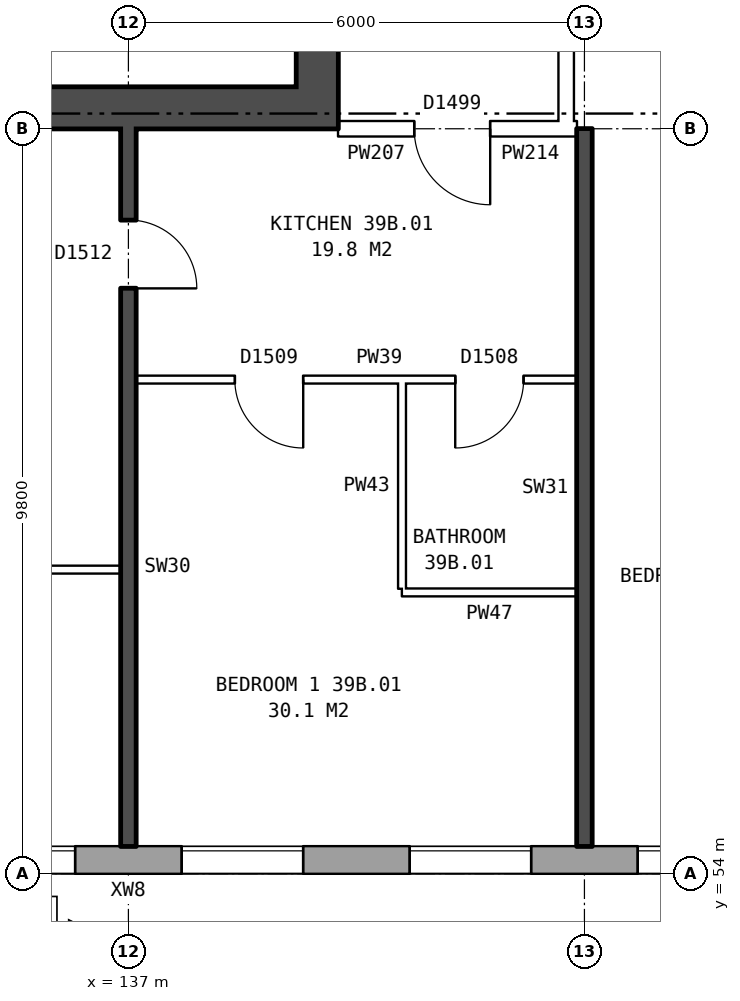
"""IFC4 building model, lengths in metres.
Left out: names, types, materials, properties, quantities, classifications, styles, units other than length and angle.
Written with IfcOpenShell. Run it as: python <this file> out.ifc"""

import sys

from ifc_helpers import new_model, si_unit, direction, frame, frame_2d, origin, place, context, subcontext, project, spatial, rectangle, extrude, element, fill, save


model = new_model("IFC4")
c1 = context("Model", 3, precision=1e-05, world=origin(), true_north=direction((0.0, 1.0)))
c2 = subcontext(c1, "Body", "Model", "MODEL_VIEW")
j1 = project(units=[si_unit("LENGTHUNIT", "METRE"), si_unit("PLANEANGLEUNIT", "RADIAN")], contexts=[c1])
p1 = place(None, origin())
s1 = spatial("IfcSite", under=j1, at=p1, CompositionType="ELEMENT")
p2 = place(p1, origin())
s2 = spatial("IfcBuilding", under=s1, at=p2, CompositionType="ELEMENT")
p3 = place(p2, frame((0.0, 0.0, 139.2)))
s3 = spatial("IfcBuildingStorey", under=s2, at=p3, CompositionType="ELEMENT", Elevation=139.2)
p4 = place(p3, frame((134.075, 54.18, 0.0), z_axis=(0.0, 0.0, 1.0), x_axis=(1.0, 0.0, 0.0)))
e1 = element("IfcWall", 1, at=p4, inside=s3, PredefinedType="STANDARD", context=c2, shape_type="SweptSolid", body=[
    extrude(rectangle(XDim=35.601, YDim=0.36, at=frame_2d((17.8, 0.0))), origin(), (0.0, 0.0, 1.0), 2.85),
])
p5 = place(p4, frame((0.625, 0.0, 0.8)))
e2 = element("IfcOpeningElement", 2, at=p5, cuts=e1, PredefinedType="OPENING", context=c2, shape_type="SweptSolid", body=[
    extrude(rectangle(XDim=1.6, YDim=1.8, at=frame_2d((0.8, 0.9))), frame((0.0, 0.19, 0.0), z_axis=(0.0, -1.0, 0.0), x_axis=(1.0, 0.0, 0.0)), (0.0, 0.0, 1.0), 0.38),
])
p6 = place(p4, frame((3.625, 0.0, 0.8)))
e3 = element("IfcOpeningElement", 3, at=p6, cuts=e1, PredefinedType="OPENING", context=c2, shape_type="SweptSolid", body=[
    extrude(rectangle(XDim=1.6, YDim=1.8, at=frame_2d((0.8, 0.9))), frame((0.0, 0.19, 0.0), z_axis=(0.0, -1.0, 0.0), x_axis=(1.0, 0.0, 0.0)), (0.0, 0.0, 1.0), 0.38),
])
p7 = place(p4, frame((6.625, 0.0, 0.8)))
e4 = element("IfcOpeningElement", 4, at=p7, cuts=e1, PredefinedType="OPENING", context=c2, shape_type="SweptSolid", body=[
    extrude(rectangle(XDim=1.6, YDim=1.8, at=frame_2d((0.8, 0.9))), frame((0.0, 0.19, 0.0), z_axis=(0.0, -1.0, 0.0), x_axis=(1.0, 0.0, 0.0)), (0.0, 0.0, 1.0), 0.38),
])
p8 = place(p4, frame((9.625, 0.0, 0.8)))
e5 = element("IfcOpeningElement", 5, at=p8, cuts=e1, PredefinedType="OPENING", context=c2, shape_type="SweptSolid", body=[
    extrude(rectangle(XDim=1.6, YDim=1.8, at=frame_2d((0.8, 0.9))), frame((0.0, 0.19, 0.0), z_axis=(0.0, -1.0, 0.0), x_axis=(1.0, 0.0, 0.0)), (0.0, 0.0, 1.0), 0.38),
])
p9 = place(p4, frame((12.625, 0.0, 0.8)))
e6 = element("IfcOpeningElement", 6, at=p9, cuts=e1, PredefinedType="OPENING", context=c2, shape_type="SweptSolid", body=[
    extrude(rectangle(XDim=1.6, YDim=1.8, at=frame_2d((0.8, 0.9))), frame((0.0, 0.19, 0.0), z_axis=(0.0, -1.0, 0.0), x_axis=(1.0, 0.0, 0.0)), (0.0, 0.0, 1.0), 0.38),
])
p10 = place(p4, frame((15.125, 0.0, 1.25)))
e7 = element("IfcOpeningElement", 7, at=p10, cuts=e1, PredefinedType="OPENING", context=c2, shape_type="SweptSolid", body=[
    extrude(rectangle(XDim=0.8, YDim=1.2, at=frame_2d((0.4, 0.6))), frame((0.0, 0.19, 0.0), z_axis=(0.0, -1.0, 0.0), x_axis=(1.0, 0.0, 0.0)), (0.0, 0.0, 1.0), 0.38),
])
p11 = place(p4, frame((18.075, 0.0, 0.25)))
e8 = element("IfcOpeningElement", 8, at=p11, cuts=e1, PredefinedType="OPENING", context=c2, shape_type="SweptSolid", body=[
    extrude(rectangle(XDim=0.6, YDim=0.9, at=frame_2d((0.3, 0.45))), frame((0.0, 0.19, 0.0), z_axis=(0.0, -1.0, 0.0), x_axis=(1.0, 0.0, 0.0)), (0.0, 0.0, 1.0), 0.38),
])
p12 = place(p4, frame((21.625, 0.0, 0.8)))
e9 = element("IfcOpeningElement", 9, at=p12, cuts=e1, PredefinedType="OPENING", context=c2, shape_type="SweptSolid", body=[
    extrude(rectangle(XDim=1.6, YDim=1.8, at=frame_2d((0.8, 0.9))), frame((0.0, 0.19, 0.0), z_axis=(0.0, -1.0, 0.0), x_axis=(1.0, 0.0, 0.0)), (0.0, 0.0, 1.0), 0.38),
])
p13 = place(p4, frame((24.625, 0.0, 0.8)))
e10 = element("IfcOpeningElement", 10, at=p13, cuts=e1, PredefinedType="OPENING", context=c2, shape_type="SweptSolid", body=[
    extrude(rectangle(XDim=1.6, YDim=1.8, at=frame_2d((0.8, 0.9))), frame((0.0, 0.19, 0.0), z_axis=(0.0, -1.0, 0.0), x_axis=(1.0, 0.0, 0.0)), (0.0, 0.0, 1.0), 0.38),
])
p14 = place(p4, frame((27.625, 0.0, 0.8)))
e11 = element("IfcOpeningElement", 11, at=p14, cuts=e1, PredefinedType="OPENING", context=c2, shape_type="SweptSolid", body=[
    extrude(rectangle(XDim=1.6, YDim=1.8, at=frame_2d((0.8, 0.9))), frame((0.0, 0.19, 0.0), z_axis=(0.0, -1.0, 0.0), x_axis=(1.0, 0.0, 0.0)), (0.0, 0.0, 1.0), 0.38),
])
p15 = place(p4, frame((30.625, 0.0, 0.8)))
e12 = element("IfcOpeningElement", 12, at=p15, cuts=e1, PredefinedType="OPENING", context=c2, shape_type="SweptSolid", body=[
    extrude(rectangle(XDim=1.6, YDim=1.8, at=frame_2d((0.8, 0.9))), frame((0.0, 0.19, 0.0), z_axis=(0.0, -1.0, 0.0), x_axis=(1.0, 0.0, 0.0)), (0.0, 0.0, 1.0), 0.38),
])
p16 = place(p4, frame((33.625, 0.0, 0.8)))
e13 = element("IfcOpeningElement", 13, at=p16, cuts=e1, PredefinedType="OPENING", context=c2, shape_type="SweptSolid", body=[
    extrude(rectangle(XDim=1.6, YDim=1.8, at=frame_2d((0.8, 0.9))), frame((0.0, 0.19, 0.0), z_axis=(0.0, -1.0, 0.0), x_axis=(1.0, 0.0, 0.0)), (0.0, 0.0, 1.0), 0.38),
])
p17 = place(p4, frame((16.825, 0.0, 0.15)))
e14 = element("IfcOpeningElement", 14, at=p17, cuts=e1, PredefinedType="OPENING", context=c2, shape_type="SweptSolid", body=[
    extrude(rectangle(XDim=0.8, YDim=0.9, at=frame_2d((0.4, 0.45))), frame((0.0, 0.19, 0.0), z_axis=(0.0, -1.0, 0.0), x_axis=(1.0, 0.0, 0.0)), (0.0, 0.0, 1.0), 0.38),
])
p18 = place(p4, frame((19.325, 0.0, 1.65)))
e15 = element("IfcOpeningElement", 15, at=p18, cuts=e1, PredefinedType="OPENING", context=c2, shape_type="SweptSolid", body=[
    extrude(rectangle(XDim=1.4, YDim=0.9, at=frame_2d((0.7, 0.45))), frame((0.0, 0.19, 0.0), z_axis=(0.0, -1.0, 0.0), x_axis=(1.0, 0.0, 0.0)), (0.0, 0.0, 1.0), 0.38),
])
p19 = place(p3, frame((139.485, 63.8, 0.0), z_axis=(0.0, 0.0, 1.0), x_axis=(0.0, 1.0, 0.0)))
e16 = element("IfcWall", 16, at=p19, inside=s3, PredefinedType="SHEAR", context=c2, shape_type="SweptSolid", body=[
    extrude(rectangle(XDim=12.4, YDim=0.55, at=frame_2d((6.2, 0.0))), origin(), (0.0, 0.0, 1.0), 2.85),
])
p20 = place(p19, frame((1.325, 0.0, 0.0)))
e17 = element("IfcOpeningElement", 17, at=p20, cuts=e16, PredefinedType="OPENING", context=c2, shape_type="SweptSolid", body=[
    extrude(rectangle(XDim=1.1, YDim=2.1, at=frame_2d((0.55, 1.05))), frame((0.0, 0.285, 0.0), z_axis=(0.0, -1.0, 0.0), x_axis=(1.0, 0.0, 0.0)), (0.0, 0.0, 1.0), 0.57),
])
p21 = place(p19, frame((3.6, 0.0, 0.0)))
e18 = element("IfcOpeningElement", 18, at=p21, cuts=e16, PredefinedType="OPENING", context=c2, shape_type="SweptSolid", body=[
    extrude(rectangle(XDim=1.1, YDim=2.1, at=frame_2d((0.55, 1.05))), frame((0.0, 0.285, 0.0), z_axis=(0.0, -1.0, 0.0), x_axis=(1.0, 0.0, 0.0)), (0.0, 0.0, 1.0), 0.57),
])
p22 = place(p19, frame((5.8, 0.0, 0.0)))
e19 = element("IfcOpeningElement", 19, at=p22, cuts=e16, PredefinedType="OPENING", context=c2, shape_type="SweptSolid", body=[
    extrude(rectangle(XDim=1.1, YDim=2.1, at=frame_2d((0.55, 1.05))), frame((0.0, 0.285, 0.0), z_axis=(0.0, -1.0, 0.0), x_axis=(1.0, 0.0, 0.0)), (0.0, 0.0, 1.0), 0.57),
])
p23 = place(p19, frame((9.9, 0.0, 0.0)))
e20 = element("IfcOpeningElement", 20, at=p23, cuts=e16, PredefinedType="OPENING", context=c2, shape_type="SweptSolid", body=[
    extrude(rectangle(XDim=1.1, YDim=2.1, at=frame_2d((0.55, 1.05))), frame((0.0, 0.285, 0.0), z_axis=(0.0, -1.0, 0.0), x_axis=(1.0, 0.0, 0.0)), (0.0, 0.0, 1.0), 0.57),
])
p24 = place(p19, frame((8.125, 0.0, 0.0)))
e21 = element("IfcOpeningElement", 21, at=p24, cuts=e16, PredefinedType="OPENING", context=c2, shape_type="SweptSolid", body=[
    extrude(rectangle(XDim=0.85, YDim=2.1, at=frame_2d((0.425, 1.05))), frame((0.0, 0.285, 0.0), z_axis=(0.0, -1.0, 0.0), x_axis=(1.0, 0.0, 0.0)), (0.0, 0.0, 1.0), 0.57),
])
p25 = place(p3, frame((139.21, 64.075, 0.0), z_axis=(0.0, 0.0, 1.0), x_axis=(-1.0, 0.0, 0.0)))
e22 = element("IfcWall", 22, at=p25, inside=s3, PredefinedType="SHEAR", context=c2, shape_type="SweptSolid", body=[
    extrude(rectangle(XDim=7.3, YDim=0.55, at=frame_2d((3.65, 0.0))), origin(), (0.0, 0.0, 1.0), 2.85),
])
p26 = place(p3, frame((142.76, 63.9, 0.0), z_axis=(0.0, 0.0, 1.0), x_axis=(0.0, 1.0, 0.0)))
e23 = element("IfcWall", 23, at=p26, inside=s3, PredefinedType="PARTITIONING", context=c2, shape_type="SweptSolid", body=[
    extrude(rectangle(XDim=12.2, YDim=0.2, at=frame_2d((6.1, 0.0))), origin(), (0.0, 0.0, 1.0), 2.85),
])
p27 = place(p26, frame((5.1, 0.0, 0.0)))
e24 = element("IfcOpeningElement", 24, at=p27, cuts=e23, PredefinedType="OPENING", context=c2, shape_type="SweptSolid", body=[
    extrude(rectangle(XDim=2.0, YDim=2.1, at=frame_2d((1.0, 1.05))), frame((0.0, 0.11, 0.0), z_axis=(0.0, -1.0, 0.0), x_axis=(1.0, 0.0, 0.0)), (0.0, 0.0, 1.0), 0.22),
])
p28 = place(p3, frame((140.6, 57.7, 0.0), z_axis=(0.0, 0.0, 1.0), x_axis=(1.0, 0.0, 0.0)))
e25 = element("IfcWall", 25, at=p28, inside=s3, PredefinedType="PARTITIONING", context=c2, shape_type="SweptSolid", body=[
    extrude(rectangle(XDim=2.3, YDim=0.1, at=frame_2d((1.15, 0.0))), origin(), (0.0, 0.0, 1.0), 2.85),
])
p29 = place(p3, frame((131.36, 58.0, 0.0), z_axis=(0.0, 0.0, 1.0), x_axis=(1.0, 0.0, 0.0)))
e26 = element("IfcWall", 26, at=p29, inside=s3, PredefinedType="PARTITIONING", context=c2, shape_type="SweptSolid", body=[
    extrude(rectangle(XDim=5.54, YDim=0.1, at=frame_2d((2.77, 0.0))), origin(), (0.0, 0.0, 1.0), 2.85),
])
p30 = place(p29, frame((2.32, 0.0, 0.0)))
e27 = element("IfcOpeningElement", 27, at=p30, cuts=e26, PredefinedType="OPENING", context=c2, shape_type="SweptSolid", body=[
    extrude(rectangle(XDim=0.9, YDim=2.1, at=frame_2d((0.45, 1.05))), frame((0.0, 0.06, 0.0), z_axis=(0.0, -1.0, 0.0), x_axis=(1.0, 0.0, 0.0)), (0.0, 0.0, 1.0), 0.12),
])
p31 = place(p3, frame((137.1, 60.5, 0.0), z_axis=(0.0, 0.0, 1.0), x_axis=(1.0, 0.0, 0.0)))
e28 = element("IfcWall", 28, at=p31, inside=s3, PredefinedType="PARTITIONING", context=c2, shape_type="SweptSolid", body=[
    extrude(rectangle(XDim=5.8, YDim=0.1, at=frame_2d((2.9, 0.0))), origin(), (0.0, 0.0, 1.0), 2.85),
])
p32 = place(p31, frame((1.3, 0.0, 0.0)))
e29 = element("IfcOpeningElement", 29, at=p32, cuts=e28, PredefinedType="OPENING", context=c2, shape_type="SweptSolid", body=[
    extrude(rectangle(XDim=0.9, YDim=2.1, at=frame_2d((0.45, 1.05))), frame((0.0, 0.06, 0.0), z_axis=(0.0, -1.0, 0.0), x_axis=(1.0, 0.0, 0.0)), (0.0, 0.0, 1.0), 0.12),
])
p33 = place(p31, frame((4.2, 0.0, 0.0)))
e30 = element("IfcOpeningElement", 30, at=p33, cuts=e28, PredefinedType="OPENING", context=c2, shape_type="SweptSolid", body=[
    extrude(rectangle(XDim=0.9, YDim=2.1, at=frame_2d((0.45, 1.05))), frame((0.0, 0.06, 0.0), z_axis=(0.0, -1.0, 0.0), x_axis=(1.0, 0.0, 0.0)), (0.0, 0.0, 1.0), 0.12),
])
p34 = place(p3, frame((139.76, 63.8, 0.0), z_axis=(0.0, 0.0, 1.0), x_axis=(1.0, 0.0, 0.0)))
e31 = element("IfcWall", 31, at=p34, inside=s3, PredefinedType="PARTITIONING", context=c2, shape_type="SweptSolid", body=[
    extrude(rectangle(XDim=3.0, YDim=0.2, at=frame_2d((1.5, 0.0))), origin(), (0.0, 0.0, 1.0), 2.85),
])
p35 = place(p34, frame((1.0, 0.0, 0.0)))
e32 = element("IfcOpeningElement", 32, at=p35, cuts=e31, PredefinedType="OPENING", context=c2, shape_type="SweptSolid", body=[
    extrude(rectangle(XDim=1.0, YDim=2.1, at=frame_2d((0.5, 1.05))), frame((0.0, 0.11, 0.0), z_axis=(0.0, -1.0, 0.0), x_axis=(1.0, 0.0, 0.0)), (0.0, 0.0, 1.0), 0.22),
])
p36 = place(p3, frame((142.76, 63.8, 0.0), z_axis=(0.0, 0.0, 1.0), x_axis=(1.0, 0.0, 0.0)))
e33 = element("IfcWall", 33, at=p36, inside=s3, PredefinedType="PARTITIONING", context=c2, shape_type="SweptSolid", body=[
    extrude(rectangle(XDim=0.14, YDim=0.2, at=frame_2d((0.07, 0.0))), origin(), (0.0, 0.0, 1.0), 2.85),
])
p37 = place(p3, frame((137.0, 54.36, 0.0), z_axis=(0.0, 0.0, 1.0), x_axis=(0.0, 1.0, 0.0)))
e34 = element("IfcWall", 34, at=p37, inside=s3, PredefinedType="SOLIDWALL", context=c2, shape_type="SweptSolid", body=[
    extrude(rectangle(XDim=9.44, YDim=0.2, at=frame_2d((4.72, 0.0))), origin(), (0.0, 0.0, 1.0), 2.85),
])
p38 = place(p37, frame((7.34, 0.0, 0.0)))
e35 = element("IfcOpeningElement", 35, at=p38, cuts=e34, PredefinedType="OPENING", context=c2, shape_type="SweptSolid", body=[
    extrude(rectangle(XDim=0.9, YDim=2.1, at=frame_2d((0.45, 1.05))), frame((0.0, 0.11, 0.0), z_axis=(0.0, -1.0, 0.0), x_axis=(1.0, 0.0, 0.0)), (0.0, 0.0, 1.0), 0.22),
])
p39 = place(p3, frame((140.6, 57.75, 0.0), z_axis=(0.0, 0.0, 1.0), x_axis=(0.0, 1.0, 0.0)))
e36 = element("IfcWall", 36, at=p39, inside=s3, PredefinedType="PARTITIONING", context=c2, shape_type="SweptSolid", body=[
    extrude(rectangle(XDim=2.7, YDim=0.1, at=frame_2d((1.35, 0.0))), origin(), (0.0, 0.0, 1.0), 2.85),
])
p40 = place(p3, frame((143.0, 54.36, 0.0), z_axis=(0.0, 0.0, 1.0), x_axis=(0.0, 1.0, 0.0)))
e37 = element("IfcWall", 37, at=p40, inside=s3, PredefinedType="SOLIDWALL", context=c2, shape_type="SweptSolid", body=[
    extrude(rectangle(XDim=9.44, YDim=0.2, at=frame_2d((4.72, 0.0))), origin(), (0.0, 0.0, 1.0), 2.85),
])
p41 = place(p5, origin())
e38 = element("IfcWindow", 38, at=p41, inside=s3, PartitioningType="SINGLE_PANEL", PredefinedType="WINDOW", context=c2, shape_type="SweptSolid", body=[
    extrude(rectangle(XDim=1.6, YDim=1.8, at=frame_2d((0.8, 0.9))), frame((0.0, 0.15, 0.0), z_axis=(0.0, -1.0, 0.0), x_axis=(1.0, 0.0, 0.0)), (0.0, 0.0, 1.0), 0.06),
])
fill(e2, e38)
p42 = place(p6, origin())
e39 = element("IfcWindow", 39, at=p42, inside=s3, PartitioningType="SINGLE_PANEL", PredefinedType="WINDOW", context=c2, shape_type="SweptSolid", body=[
    extrude(rectangle(XDim=1.6, YDim=1.8, at=frame_2d((0.8, 0.9))), frame((0.0, 0.15, 0.0), z_axis=(0.0, -1.0, 0.0), x_axis=(1.0, 0.0, 0.0)), (0.0, 0.0, 1.0), 0.06),
])
fill(e3, e39)
p43 = place(p7, origin())
e40 = element("IfcWindow", 40, at=p43, inside=s3, PartitioningType="SINGLE_PANEL", PredefinedType="WINDOW", context=c2, shape_type="SweptSolid", body=[
    extrude(rectangle(XDim=1.6, YDim=1.8, at=frame_2d((0.8, 0.9))), frame((0.0, 0.15, 0.0), z_axis=(0.0, -1.0, 0.0), x_axis=(1.0, 0.0, 0.0)), (0.0, 0.0, 1.0), 0.06),
])
fill(e4, e40)
p44 = place(p8, origin())
e41 = element("IfcWindow", 41, at=p44, inside=s3, PartitioningType="SINGLE_PANEL", PredefinedType="WINDOW", context=c2, shape_type="SweptSolid", body=[
    extrude(rectangle(XDim=1.6, YDim=1.8, at=frame_2d((0.8, 0.9))), frame((0.0, 0.15, 0.0), z_axis=(0.0, -1.0, 0.0), x_axis=(1.0, 0.0, 0.0)), (0.0, 0.0, 1.0), 0.06),
])
fill(e5, e41)
p45 = place(p32, frame((0.9, 0.0, 0.0), z_axis=(0.0, 0.0, 1.0), x_axis=(-1.0, 0.0, 0.0)))
e42 = element("IfcDoor", 42, at=p45, inside=s3, OperationType="SINGLE_SWING_LEFT", PredefinedType="DOOR", context=c2, shape_type="SweptSolid", body=[
    extrude(rectangle(XDim=0.9, YDim=2.1, at=frame_2d((0.45, 1.05))), frame((0.0, 0.025, 0.0), z_axis=(0.0, -1.0, 0.0), x_axis=(1.0, 0.0, 0.0)), (0.0, 0.0, 1.0), 0.05),
])
fill(e29, e42)
p46 = place(p35, frame((1.0, 0.0, 0.0), z_axis=(0.0, 0.0, 1.0), x_axis=(-1.0, 0.0, 0.0)))
e43 = element("IfcDoor", 43, at=p46, inside=s3, OperationType="SINGLE_SWING_LEFT", PredefinedType="DOOR", context=c2, shape_type="SweptSolid", body=[
    extrude(rectangle(XDim=1.0, YDim=2.1, at=frame_2d((0.5, 1.05))), frame((0.0, 0.025, 0.0), z_axis=(0.0, -1.0, 0.0), x_axis=(1.0, 0.0, 0.0)), (0.0, 0.0, 1.0), 0.05),
])
fill(e32, e43)
p47 = place(p38, frame((0.9, 0.0, 0.0), z_axis=(0.0, 0.0, 1.0), x_axis=(-1.0, 0.0, 0.0)))
e44 = element("IfcDoor", 44, at=p47, inside=s3, OperationType="SINGLE_SWING_RIGHT", PredefinedType="DOOR", context=c2, shape_type="SweptSolid", body=[
    extrude(rectangle(XDim=0.9, YDim=2.1, at=frame_2d((0.45, 1.05))), frame((0.0, 0.025, 0.0), z_axis=(0.0, -1.0, 0.0), x_axis=(1.0, 0.0, 0.0)), (0.0, 0.0, 1.0), 0.05),
])
fill(e35, e44)
p48 = place(p33, frame((0.9, 0.0, 0.0), z_axis=(0.0, 0.0, 1.0), x_axis=(-1.0, 0.0, 0.0)))
e45 = element("IfcDoor", 45, at=p48, inside=s3, OperationType="SINGLE_SWING_RIGHT", PredefinedType="DOOR", context=c2, shape_type="SweptSolid", body=[
    extrude(rectangle(XDim=0.9, YDim=2.1, at=frame_2d((0.45, 1.05))), frame((0.0, 0.025, 0.0), z_axis=(0.0, -1.0, 0.0), x_axis=(1.0, 0.0, 0.0)), (0.0, 0.0, 1.0), 0.05),
])
fill(e30, e45)
save(model, sys.argv[1])
